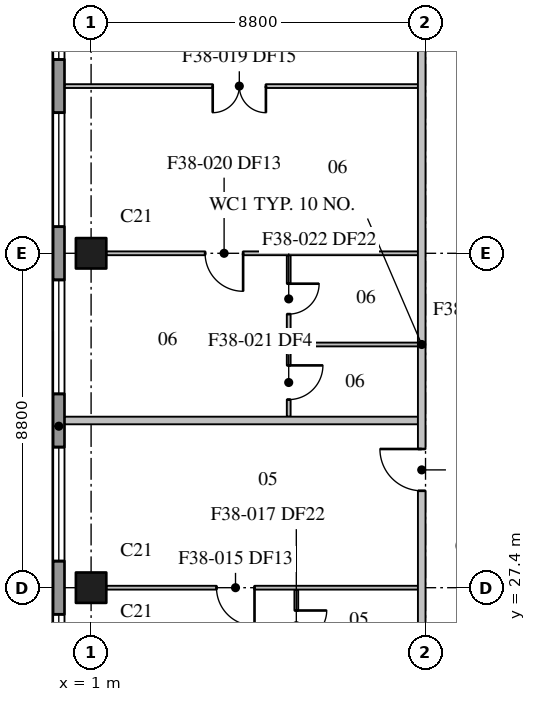
"""IFC4 building model, lengths in metres.
Left out: names, types, materials, properties, quantities, classifications, styles, units other than length and angle.
Written with IfcOpenShell. Run it as: python <this file> out.ifc"""

import sys

from ifc_helpers import new_model, si_unit, direction, frame, frame_2d, origin, origin_2d, place, context, subcontext, project, spatial, rectangle, extrude, element, fill, save


model = new_model("IFC4")
c1 = context("Model", 3, precision=1e-05, world=origin(), true_north=direction((0.0, 1.0)))
c2 = subcontext(c1, "Body", "Model", "MODEL_VIEW")
j1 = project(units=[si_unit("LENGTHUNIT", "METRE"), si_unit("PLANEANGLEUNIT", "RADIAN")], contexts=[c1])
p1 = place(None, origin())
s1 = spatial("IfcSite", under=j1, at=p1, CompositionType="ELEMENT")
p2 = place(p1, origin())
s2 = spatial("IfcBuilding", under=s1, at=p2, CompositionType="ELEMENT")
p3 = place(p2, frame((0.0, 0.0, 305.5)))
s3 = spatial("IfcBuildingStorey", under=s2, at=p3, CompositionType="ELEMENT", Elevation=305.5)
for number, where, z_axis, x_axis in (
    (1, (1.0, 27.4, 0.0), (0.0, 0.0, 1.0), (1.0, 0.0, 0.0)),
    (2, (1.0, 36.2, 0.0), (0.0, 0.0, 1.0), (1.0, 0.0, 0.0)),
):
    element("IfcColumn", number, at=place(p3, frame(where, z_axis=z_axis, x_axis=x_axis)), inside=s3, PredefinedType="COLUMN", context=c2, shape_type="SweptSolid", body=[
        extrude(rectangle(XDim=0.8, YDim=0.8, at=origin_2d()), origin(), (0.0, 0.0, 1.0), 3.7),
    ])
p4 = place(p3, frame((0.15, 61.1, 0.0), z_axis=(0.0, 0.0, 1.0), x_axis=(0.0, -1.0, 0.0)))
e3 = element("IfcWall", 3, at=p4, inside=s3, PredefinedType="STANDARD", context=c2, shape_type="SweptSolid", body=[
    extrude(rectangle(XDim=58.9, YDim=0.3, at=frame_2d((29.45, 0.0))), origin(), (0.0, 0.0, 1.0), 3.25),
])
p5 = place(p4, frame((3.6, 0.0, 0.75)))
e4 = element("IfcOpeningElement", 4, at=p5, cuts=e3, PredefinedType="OPENING", context=c2, shape_type="SweptSolid", body=[
    extrude(rectangle(XDim=3.0, YDim=2.3, at=frame_2d((1.5, 1.15))), frame((0.0, 0.16, 0.0), z_axis=(0.0, -1.0, 0.0), x_axis=(1.0, 0.0, 0.0)), (0.0, 0.0, 1.0), 0.32),
])
p6 = place(p4, frame((8.0, 0.0, 0.75)))
e5 = element("IfcOpeningElement", 5, at=p6, cuts=e3, PredefinedType="OPENING", context=c2, shape_type="SweptSolid", body=[
    extrude(rectangle(XDim=3.0, YDim=2.3, at=frame_2d((1.5, 1.15))), frame((0.0, 0.16, 0.0), z_axis=(0.0, -1.0, 0.0), x_axis=(1.0, 0.0, 0.0)), (0.0, 0.0, 1.0), 0.32),
])
p7 = place(p4, frame((12.4, 0.0, 0.75)))
e6 = element("IfcOpeningElement", 6, at=p7, cuts=e3, PredefinedType="OPENING", context=c2, shape_type="SweptSolid", body=[
    extrude(rectangle(XDim=3.0, YDim=2.3, at=frame_2d((1.5, 1.15))), frame((0.0, 0.16, 0.0), z_axis=(0.0, -1.0, 0.0), x_axis=(1.0, 0.0, 0.0)), (0.0, 0.0, 1.0), 0.32),
])
p8 = place(p4, frame((16.8, 0.0, 0.75)))
e7 = element("IfcOpeningElement", 7, at=p8, cuts=e3, PredefinedType="OPENING", context=c2, shape_type="SweptSolid", body=[
    extrude(rectangle(XDim=3.0, YDim=2.3, at=frame_2d((1.5, 1.15))), frame((0.0, 0.16, 0.0), z_axis=(0.0, -1.0, 0.0), x_axis=(1.0, 0.0, 0.0)), (0.0, 0.0, 1.0), 0.32),
])
p9 = place(p4, frame((21.2, 0.0, 0.75)))
e8 = element("IfcOpeningElement", 8, at=p9, cuts=e3, PredefinedType="OPENING", context=c2, shape_type="SweptSolid", body=[
    extrude(rectangle(XDim=3.0, YDim=2.3, at=frame_2d((1.5, 1.15))), frame((0.0, 0.16, 0.0), z_axis=(0.0, -1.0, 0.0), x_axis=(1.0, 0.0, 0.0)), (0.0, 0.0, 1.0), 0.32),
])
p10 = place(p4, frame((25.6, 0.0, 0.75)))
e9 = element("IfcOpeningElement", 9, at=p10, cuts=e3, PredefinedType="OPENING", context=c2, shape_type="SweptSolid", body=[
    extrude(rectangle(XDim=3.0, YDim=2.3, at=frame_2d((1.5, 1.15))), frame((0.0, 0.16, 0.0), z_axis=(0.0, -1.0, 0.0), x_axis=(1.0, 0.0, 0.0)), (0.0, 0.0, 1.0), 0.32),
])
p11 = place(p4, frame((30.0, 0.0, 0.75)))
e10 = element("IfcOpeningElement", 10, at=p11, cuts=e3, PredefinedType="OPENING", context=c2, shape_type="SweptSolid", body=[
    extrude(rectangle(XDim=3.0, YDim=2.3, at=frame_2d((1.5, 1.15))), frame((0.0, 0.16, 0.0), z_axis=(0.0, -1.0, 0.0), x_axis=(1.0, 0.0, 0.0)), (0.0, 0.0, 1.0), 0.32),
])
p12 = place(p4, frame((34.4, 0.0, 0.75)))
e11 = element("IfcOpeningElement", 11, at=p12, cuts=e3, PredefinedType="OPENING", context=c2, shape_type="SweptSolid", body=[
    extrude(rectangle(XDim=3.0, YDim=2.3, at=frame_2d((1.5, 1.15))), frame((0.0, 0.16, 0.0), z_axis=(0.0, -1.0, 0.0), x_axis=(1.0, 0.0, 0.0)), (0.0, 0.0, 1.0), 0.32),
])
p13 = place(p4, frame((38.8, 0.0, 0.75)))
e12 = element("IfcOpeningElement", 12, at=p13, cuts=e3, PredefinedType="OPENING", context=c2, shape_type="SweptSolid", body=[
    extrude(rectangle(XDim=3.0, YDim=2.3, at=frame_2d((1.5, 1.15))), frame((0.0, 0.16, 0.0), z_axis=(0.0, -1.0, 0.0), x_axis=(1.0, 0.0, 0.0)), (0.0, 0.0, 1.0), 0.32),
])
p14 = place(p4, frame((43.2, 0.0, 0.75)))
e13 = element("IfcOpeningElement", 13, at=p14, cuts=e3, PredefinedType="OPENING", context=c2, shape_type="SweptSolid", body=[
    extrude(rectangle(XDim=3.0, YDim=2.3, at=frame_2d((1.5, 1.15))), frame((0.0, 0.16, 0.0), z_axis=(0.0, -1.0, 0.0), x_axis=(1.0, 0.0, 0.0)), (0.0, 0.0, 1.0), 0.32),
])
p15 = place(p4, frame((47.6, 0.0, 0.75)))
e14 = element("IfcOpeningElement", 14, at=p15, cuts=e3, PredefinedType="OPENING", context=c2, shape_type="SweptSolid", body=[
    extrude(rectangle(XDim=3.0, YDim=2.3, at=frame_2d((1.5, 1.15))), frame((0.0, 0.16, 0.0), z_axis=(0.0, -1.0, 0.0), x_axis=(1.0, 0.0, 0.0)), (0.0, 0.0, 1.0), 0.32),
])
p16 = place(p4, frame((52.0, 0.0, 0.75)))
e15 = element("IfcOpeningElement", 15, at=p16, cuts=e3, PredefinedType="OPENING", context=c2, shape_type="SweptSolid", body=[
    extrude(rectangle(XDim=3.0, YDim=2.3, at=frame_2d((1.5, 1.15))), frame((0.0, 0.16, 0.0), z_axis=(0.0, -1.0, 0.0), x_axis=(1.0, 0.0, 0.0)), (0.0, 0.0, 1.0), 0.32),
])
p17 = place(p3, frame((9.7, 9.8, 0.0), z_axis=(0.0, 0.0, 1.0), x_axis=(0.0, 1.0, 0.0)))
e16 = element("IfcWall", 16, at=p17, inside=s3, PredefinedType="PARTITIONING", context=c2, shape_type="SweptSolid", body=[
    extrude(rectangle(XDim=48.0, YDim=0.2, at=frame_2d((24.0, 0.0))), origin(), (0.0, 0.0, 1.0), 3.25),
])
p18 = place(p17, frame((6.95, 0.0, 0.0)))
e17 = element("IfcOpeningElement", 17, at=p18, cuts=e16, PredefinedType="OPENING", context=c2, shape_type="SweptSolid", body=[
    extrude(rectangle(XDim=1.1, YDim=2.1, at=frame_2d((0.55, 1.05))), frame((0.0, 0.11, 0.0), z_axis=(0.0, -1.0, 0.0), x_axis=(1.0, 0.0, 0.0)), (0.0, 0.0, 1.0), 0.22),
])
p19 = place(p17, frame((20.15, 0.0, 0.0)))
e18 = element("IfcOpeningElement", 18, at=p19, cuts=e16, PredefinedType="OPENING", context=c2, shape_type="SweptSolid", body=[
    extrude(rectangle(XDim=1.1, YDim=2.1, at=frame_2d((0.55, 1.05))), frame((0.0, 0.11, 0.0), z_axis=(0.0, -1.0, 0.0), x_axis=(1.0, 0.0, 0.0)), (0.0, 0.0, 1.0), 0.22),
])
p20 = place(p17, frame((37.75, 0.0, 0.0)))
e19 = element("IfcOpeningElement", 19, at=p20, cuts=e16, PredefinedType="OPENING", context=c2, shape_type="SweptSolid", body=[
    extrude(rectangle(XDim=1.1, YDim=2.1, at=frame_2d((0.55, 1.05))), frame((0.0, 0.11, 0.0), z_axis=(0.0, -1.0, 0.0), x_axis=(1.0, 0.0, 0.0)), (0.0, 0.0, 1.0), 0.22),
])
p21 = place(p17, frame((41.2, 0.0, 0.0)))
e20 = element("IfcOpeningElement", 20, at=p21, cuts=e16, PredefinedType="OPENING", context=c2, shape_type="SweptSolid", body=[
    extrude(rectangle(XDim=1.1, YDim=2.1, at=frame_2d((0.55, 1.05))), frame((0.0, 0.11, 0.0), z_axis=(0.0, -1.0, 0.0), x_axis=(1.0, 0.0, 0.0)), (0.0, 0.0, 1.0), 0.22),
])
p22 = place(p3, frame((0.31, 31.8, 0.0), z_axis=(0.0, 0.0, 1.0), x_axis=(1.0, 0.0, 0.0)))
e21 = element("IfcWall", 21, at=p22, inside=s3, PredefinedType="PARTITIONING", context=c2, shape_type="SweptSolid", body=[
    extrude(rectangle(XDim=9.29, YDim=0.2, at=frame_2d((4.645, 0.0))), origin(), (0.0, 0.0, 1.0), 3.25),
])
p23 = place(p3, frame((6.4, 27.35, 0.0), z_axis=(0.0, 0.0, 1.0), x_axis=(0.0, -1.0, 0.0)))
e22 = element("IfcWall", 22, at=p23, inside=s3, PredefinedType="PARTITIONING", context=c2, shape_type="SweptSolid", body=[
    extrude(rectangle(XDim=4.4, YDim=0.1, at=frame_2d((2.2, 0.0))), origin(), (0.0, 0.0, 1.0), 3.25),
])
p24 = place(p23, frame((2.7, 0.0, 0.0)))
e23 = element("IfcOpeningElement", 23, at=p24, cuts=e22, PredefinedType="OPENING", context=c2, shape_type="SweptSolid", body=[
    extrude(rectangle(XDim=0.9, YDim=2.1, at=frame_2d((0.45, 1.05))), frame((0.0, 0.06, 0.0), z_axis=(0.0, -1.0, 0.0), x_axis=(1.0, 0.0, 0.0)), (0.0, 0.0, 1.0), 0.12),
])
p25 = place(p23, frame((0.55, 0.0, 0.0)))
e24 = element("IfcOpeningElement", 24, at=p25, cuts=e22, PredefinedType="OPENING", context=c2, shape_type="SweptSolid", body=[
    extrude(rectangle(XDim=0.8, YDim=2.1, at=frame_2d((0.4, 1.05))), frame((0.0, 0.06, 0.0), z_axis=(0.0, -1.0, 0.0), x_axis=(1.0, 0.0, 0.0)), (0.0, 0.0, 1.0), 0.12),
])
p26 = place(p3, frame((9.6, 27.4, 0.0), z_axis=(0.0, 0.0, 1.0), x_axis=(-1.0, 0.0, 0.0)))
e25 = element("IfcWall", 25, at=p26, inside=s3, PredefinedType="PARTITIONING", context=c2, shape_type="SweptSolid", body=[
    extrude(rectangle(XDim=8.2, YDim=0.1, at=frame_2d((4.1, 0.0))), origin(), (0.0, 0.0, 1.0), 3.25),
])
p27 = place(p26, frame((4.3, 0.0, 0.0)))
e26 = element("IfcOpeningElement", 26, at=p27, cuts=e25, PredefinedType="OPENING", context=c2, shape_type="SweptSolid", body=[
    extrude(rectangle(XDim=1.0, YDim=2.1, at=frame_2d((0.5, 1.05))), frame((0.0, 0.06, 0.0), z_axis=(0.0, -1.0, 0.0), x_axis=(1.0, 0.0, 0.0)), (0.0, 0.0, 1.0), 0.12),
])
p28 = place(p3, frame((6.2, 36.15, 0.0), z_axis=(0.0, 0.0, 1.0), x_axis=(0.0, -1.0, 0.0)))
e27 = element("IfcWall", 27, at=p28, inside=s3, PredefinedType="PARTITIONING", context=c2, shape_type="SweptSolid", body=[
    extrude(rectangle(XDim=4.25, YDim=0.1, at=frame_2d((2.125, 0.0))), origin(), (0.0, 0.0, 1.0), 3.25),
])
p29 = place(p28, frame((2.9, 0.0, 0.0)))
e28 = element("IfcOpeningElement", 28, at=p29, cuts=e27, PredefinedType="OPENING", context=c2, shape_type="SweptSolid", body=[
    extrude(rectangle(XDim=0.9, YDim=2.1, at=frame_2d((0.45, 1.05))), frame((0.0, 0.06, 0.0), z_axis=(0.0, -1.0, 0.0), x_axis=(1.0, 0.0, 0.0)), (0.0, 0.0, 1.0), 0.12),
])
p30 = place(p28, frame((0.75, 0.0, 0.0)))
e29 = element("IfcOpeningElement", 29, at=p30, cuts=e27, PredefinedType="OPENING", context=c2, shape_type="SweptSolid", body=[
    extrude(rectangle(XDim=0.8, YDim=2.1, at=frame_2d((0.4, 1.05))), frame((0.0, 0.06, 0.0), z_axis=(0.0, -1.0, 0.0), x_axis=(1.0, 0.0, 0.0)), (0.0, 0.0, 1.0), 0.12),
])
p31 = place(p3, frame((9.6, 40.6, 0.0), z_axis=(0.0, 0.0, 1.0), x_axis=(-1.0, 0.0, 0.0)))
e30 = element("IfcWall", 30, at=p31, inside=s3, PredefinedType="PARTITIONING", context=c2, shape_type="SweptSolid", body=[
    extrude(rectangle(XDim=9.29, YDim=0.1, at=frame_2d((4.645, 0.0))), origin(), (0.0, 0.0, 1.0), 3.25),
])
p32 = place(p31, frame((4.0, 0.0, 0.0)))
e31 = element("IfcOpeningElement", 31, at=p32, cuts=e30, PredefinedType="OPENING", context=c2, shape_type="SweptSolid", body=[
    extrude(rectangle(XDim=1.4, YDim=2.1, at=frame_2d((0.7, 1.05))), frame((0.0, 0.06, 0.0), z_axis=(0.0, -1.0, 0.0), x_axis=(1.0, 0.0, 0.0)), (0.0, 0.0, 1.0), 0.12),
])
p33 = place(p3, frame((9.6, 36.2, 0.0), z_axis=(0.0, 0.0, 1.0), x_axis=(-1.0, 0.0, 0.0)))
e32 = element("IfcWall", 32, at=p33, inside=s3, PredefinedType="PARTITIONING", context=c2, shape_type="SweptSolid", body=[
    extrude(rectangle(XDim=8.2, YDim=0.1, at=frame_2d((4.1, 0.0))), origin(), (0.0, 0.0, 1.0), 3.25),
])
p34 = place(p33, frame((4.6, 0.0, 0.0)))
e33 = element("IfcOpeningElement", 33, at=p34, cuts=e32, PredefinedType="OPENING", context=c2, shape_type="SweptSolid", body=[
    extrude(rectangle(XDim=1.0, YDim=2.1, at=frame_2d((0.5, 1.05))), frame((0.0, 0.06, 0.0), z_axis=(0.0, -1.0, 0.0), x_axis=(1.0, 0.0, 0.0)), (0.0, 0.0, 1.0), 0.12),
])
p35 = place(p3, frame((6.25, 33.8, 0.0), z_axis=(0.0, 0.0, 1.0), x_axis=(1.0, 0.0, 0.0)))
e34 = element("IfcWall", 34, at=p35, inside=s3, PredefinedType="PARTITIONING", context=c2, shape_type="SweptSolid", body=[
    extrude(rectangle(XDim=3.35, YDim=0.1, at=frame_2d((1.675, 0.0))), origin(), (0.0, 0.0, 1.0), 3.25),
])
p36 = place(p8, origin())
e35 = element("IfcWindow", 35, at=p36, inside=s3, PartitioningType="SINGLE_PANEL", PredefinedType="WINDOW", context=c2, shape_type="SweptSolid", body=[
    extrude(rectangle(XDim=3.0, YDim=2.3, at=frame_2d((1.5, 1.15))), frame((0.0, 0.03, 0.0), z_axis=(0.0, -1.0, 0.0), x_axis=(1.0, 0.0, 0.0)), (0.0, 0.0, 1.0), 0.06),
])
fill(e7, e35)
p37 = place(p9, origin())
e36 = element("IfcWindow", 36, at=p37, inside=s3, PartitioningType="SINGLE_PANEL", PredefinedType="WINDOW", context=c2, shape_type="SweptSolid", body=[
    extrude(rectangle(XDim=3.0, YDim=2.3, at=frame_2d((1.5, 1.15))), frame((0.0, 0.03, 0.0), z_axis=(0.0, -1.0, 0.0), x_axis=(1.0, 0.0, 0.0)), (0.0, 0.0, 1.0), 0.06),
])
fill(e8, e36)
p38 = place(p10, origin())
e37 = element("IfcWindow", 37, at=p38, inside=s3, PartitioningType="SINGLE_PANEL", PredefinedType="WINDOW", context=c2, shape_type="SweptSolid", body=[
    extrude(rectangle(XDim=3.0, YDim=2.3, at=frame_2d((1.5, 1.15))), frame((0.0, 0.03, 0.0), z_axis=(0.0, -1.0, 0.0), x_axis=(1.0, 0.0, 0.0)), (0.0, 0.0, 1.0), 0.06),
])
fill(e9, e37)
p39 = place(p11, origin())
e38 = element("IfcWindow", 38, at=p39, inside=s3, PartitioningType="SINGLE_PANEL", PredefinedType="WINDOW", context=c2, shape_type="SweptSolid", body=[
    extrude(rectangle(XDim=3.0, YDim=2.3, at=frame_2d((1.5, 1.15))), frame((0.0, 0.03, 0.0), z_axis=(0.0, -1.0, 0.0), x_axis=(1.0, 0.0, 0.0)), (0.0, 0.0, 1.0), 0.06),
])
fill(e10, e38)
p40 = place(p12, origin())
e39 = element("IfcWindow", 39, at=p40, inside=s3, PartitioningType="SINGLE_PANEL", PredefinedType="WINDOW", context=c2, shape_type="SweptSolid", body=[
    extrude(rectangle(XDim=3.0, YDim=2.3, at=frame_2d((1.5, 1.15))), frame((0.0, 0.03, 0.0), z_axis=(0.0, -1.0, 0.0), x_axis=(1.0, 0.0, 0.0)), (0.0, 0.0, 1.0), 0.06),
])
fill(e11, e39)
p41 = place(p19, origin())
e40 = element("IfcDoor", 40, at=p41, inside=s3, OperationType="SINGLE_SWING_RIGHT", PredefinedType="DOOR", context=c2, shape_type="SweptSolid", body=[
    extrude(rectangle(XDim=1.1, YDim=2.1, at=frame_2d((0.55, 1.05))), frame((0.0, 0.025, 0.0), z_axis=(0.0, -1.0, 0.0), x_axis=(1.0, 0.0, 0.0)), (0.0, 0.0, 1.0), 0.05),
])
fill(e18, e40)
p42 = place(p27, origin())
e41 = element("IfcDoor", 41, at=p42, inside=s3, OperationType="SINGLE_SWING_LEFT", PredefinedType="DOOR", context=c2, shape_type="SweptSolid", body=[
    extrude(rectangle(XDim=1.0, YDim=2.1, at=frame_2d((0.5, 1.05))), frame((0.0, 0.025, 0.0), z_axis=(0.0, -1.0, 0.0), x_axis=(1.0, 0.0, 0.0)), (0.0, 0.0, 1.0), 0.05),
])
fill(e26, e41)
p43 = place(p25, origin())
e42 = element("IfcDoor", 42, at=p43, inside=s3, OperationType="SINGLE_SWING_LEFT", PredefinedType="DOOR", context=c2, shape_type="SweptSolid", body=[
    extrude(rectangle(XDim=0.8, YDim=2.1, at=frame_2d((0.4, 1.05))), frame((0.0, 0.025, 0.0), z_axis=(0.0, -1.0, 0.0), x_axis=(1.0, 0.0, 0.0)), (0.0, 0.0, 1.0), 0.05),
])
fill(e24, e42)
p44 = place(p32, origin())
e43 = element("IfcDoor", 43, at=p44, inside=s3, OperationType="DOUBLE_DOOR_SINGLE_SWING", PredefinedType="DOOR", context=c2, shape_type="SweptSolid", body=[
    extrude(rectangle(XDim=1.4, YDim=2.1, at=frame_2d((0.7, 1.05))), frame((0.0, 0.025, 0.0), z_axis=(0.0, -1.0, 0.0), x_axis=(1.0, 0.0, 0.0)), (0.0, 0.0, 1.0), 0.05),
])
fill(e31, e43)
p45 = place(p34, origin())
e44 = element("IfcDoor", 44, at=p45, inside=s3, OperationType="SINGLE_SWING_LEFT", PredefinedType="DOOR", context=c2, shape_type="SweptSolid", body=[
    extrude(rectangle(XDim=1.0, YDim=2.1, at=frame_2d((0.5, 1.05))), frame((0.0, 0.025, 0.0), z_axis=(0.0, -1.0, 0.0), x_axis=(1.0, 0.0, 0.0)), (0.0, 0.0, 1.0), 0.05),
])
fill(e33, e44)
p46 = place(p29, origin())
e45 = element("IfcDoor", 45, at=p46, inside=s3, OperationType="SINGLE_SWING_LEFT", PredefinedType="DOOR", context=c2, shape_type="SweptSolid", body=[
    extrude(rectangle(XDim=0.9, YDim=2.1, at=frame_2d((0.45, 1.05))), frame((0.0, 0.025, 0.0), z_axis=(0.0, -1.0, 0.0), x_axis=(1.0, 0.0, 0.0)), (0.0, 0.0, 1.0), 0.05),
])
fill(e28, e45)
p47 = place(p30, origin())
e46 = element("IfcDoor", 46, at=p47, inside=s3, OperationType="SINGLE_SWING_LEFT", PredefinedType="DOOR", context=c2, shape_type="SweptSolid", body=[
    extrude(rectangle(XDim=0.8, YDim=2.1, at=frame_2d((0.4, 1.05))), frame((0.0, 0.025, 0.0), z_axis=(0.0, -1.0, 0.0), x_axis=(1.0, 0.0, 0.0)), (0.0, 0.0, 1.0), 0.05),
])
fill(e29, e46)
save(model, sys.argv[1])
